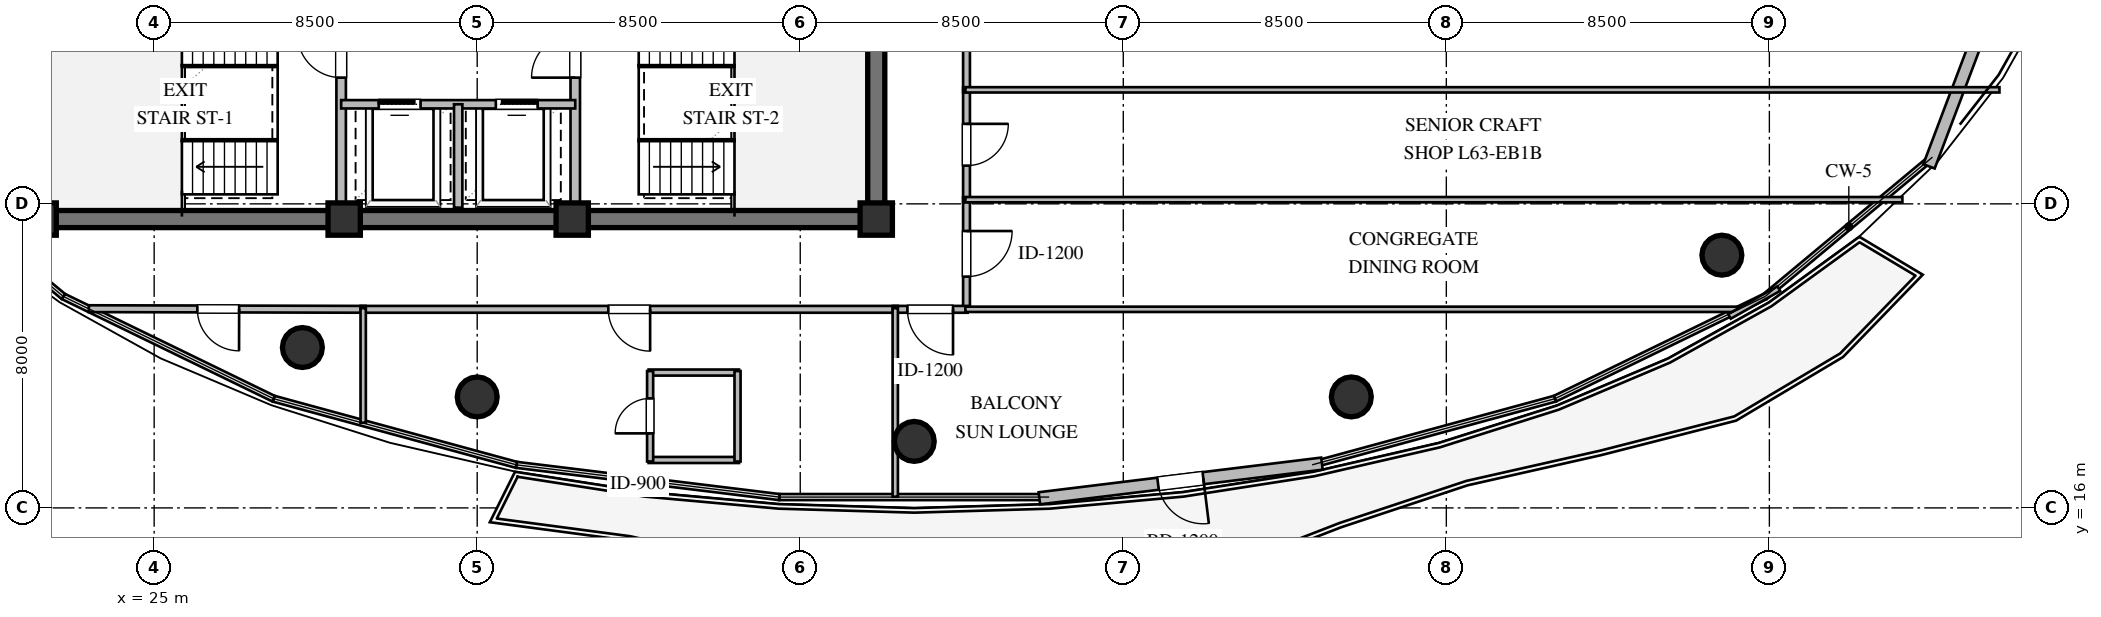
"""IFC4 building model, lengths in metres.
Left out: names, types, materials, properties, quantities, classifications, styles, units other than length and angle.
Written with IfcOpenShell. Run it as: python <this file> out.ifc"""

import sys

from ifc_helpers import new_model, si_unit, direction, frame, frame_2d, origin, origin_2d, place, context, subcontext, project, spatial, rectangle, circle, extrude, element, fill, save


model = new_model("IFC4")
c1 = context("Model", 3, precision=1e-05, world=origin(), true_north=direction((0.0, 1.0)))
c2 = subcontext(c1, "Body", "Model", "MODEL_VIEW")
j1 = project(units=[si_unit("LENGTHUNIT", "METRE"), si_unit("PLANEANGLEUNIT", "RADIAN")], contexts=[c1])
p1 = place(None, origin())
s1 = spatial("IfcSite", under=j1, at=p1, CompositionType="ELEMENT")
p2 = place(p1, origin())
s2 = spatial("IfcBuilding", under=s1, at=p2, CompositionType="ELEMENT")
p3 = place(p2, frame((0.0, 0.0, 238.8)))
s3 = spatial("IfcBuildingStorey", under=s2, at=p3, CompositionType="ELEMENT", Elevation=238.8)
p4 = place(p3, frame((21.775, 23.6, 0.0), z_axis=(0.0, 0.0, 1.0), x_axis=(1.0, 0.0, 0.0)))
e1 = element("IfcWall", 1, at=p4, inside=s3, PredefinedType="SHEAR", context=c2, shape_type="SweptSolid", body=[
    extrude(rectangle(XDim=22.45, YDim=0.45, at=frame_2d((11.225, 0.0))), origin(), (0.0, 0.0, 1.0), 3.36),
])
p5 = place(p3, frame((44.0, 23.825, 0.0), z_axis=(0.0, 0.0, 1.0), x_axis=(0.0, 1.0, 0.0)))
e2 = element("IfcWall", 2, at=p5, inside=s3, PredefinedType="SHEAR", context=c2, shape_type="SweptSolid", body=[
    extrude(rectangle(XDim=12.35, YDim=0.45, at=frame_2d((6.175, 0.0))), origin(), (0.0, 0.0, 1.0), 3.36),
])
p6 = place(p5, frame((8.675, 0.0, 0.0)))
e3 = element("IfcOpeningElement", 3, at=p6, cuts=e2, PredefinedType="OPENING", context=c2, shape_type="SweptSolid", body=[
    extrude(rectangle(XDim=1.5, YDim=2.15, at=frame_2d((0.75, 1.075))), frame((0.0, 0.235, 0.0), z_axis=(0.0, -1.0, 0.0), x_axis=(1.0, 0.0, 0.0)), (0.0, 0.0, 1.0), 0.47),
])
for number, where, z_axis, x_axis in (
    (4, (22.0, 23.6, 0.0), (0.0, 0.0, 1.0), (1.0, 0.0, 0.0)),
    (5, (30.0, 23.6, 0.0), (0.0, 0.0, 1.0), (1.0, 0.0, 0.0)),
    (6, (36.0, 23.6, 0.0), (0.0, 0.0, 1.0), (1.0, 0.0, 0.0)),
    (7, (44.0, 23.6, 0.0), (0.0, 0.0, 1.0), (1.0, 0.0, 0.0)),
):
    element("IfcColumn", number, at=place(p3, frame(where, z_axis=z_axis, x_axis=x_axis)), inside=s3, PredefinedType="COLUMN", context=c2, shape_type="SweptSolid", body=[
        extrude(rectangle(XDim=0.85, YDim=0.85, at=origin_2d()), origin(), (0.0, 0.0, 1.0), 3.6),
    ])
for number, where, z_axis, x_axis in (
    (8, (28.9, 20.22, 0.0), (0.0, 0.0, 1.0), (1.0, 0.0, 0.0)),
    (9, (33.5, 18.92, 0.0), (0.0, 0.0, 1.0), (1.0, 0.0, 0.0)),
    (10, (45.0, 17.75, 0.0), (0.0, 0.0, 1.0), (1.0, 0.0, 0.0)),
    (11, (56.5, 18.92, 0.0), (0.0, 0.0, 1.0), (1.0, 0.0, 0.0)),
    (12, (66.25, 22.65, 0.0), (0.0, 0.0, 1.0), (1.0, 0.0, 0.0)),
):
    element("IfcColumn", number, at=place(p3, frame(where, z_axis=z_axis, x_axis=x_axis)), inside=s3, PredefinedType="COLUMN", context=c2, shape_type="SweptSolid", body=[
        extrude(circle(Radius=0.525, at=origin_2d()), origin(), (0.0, 0.0, 1.0), 3.6),
    ])
p7 = place(p3, frame((76.712, 38.243, 0.0), z_axis=(0.0, 0.0, 1.0), x_axis=(-0.353659523244, -0.935374225441, 0.0)))
e13 = element("IfcWall", 13, at=p7, inside=s3, PredefinedType="STANDARD", context=c2, shape_type="SweptSolid", body=[
    extrude(rectangle(XDim=14.172, YDim=0.32, at=frame_2d((7.086, 0.0))), origin(), (0.0, 0.0, 1.0), 3.36),
])
p8 = place(p3, frame((55.727, 17.165, 0.0), z_axis=(0.0, 0.0, 1.0), x_axis=(-0.992559081031, -0.121763995755, 0.0)))
e14 = element("IfcWall", 14, at=p8, inside=s3, PredefinedType="STANDARD", context=c2, shape_type="SweptSolid", body=[
    extrude(rectangle(XDim=7.491, YDim=0.32, at=frame_2d((3.745, 0.0))), origin(), (0.0, 0.0, 1.0), 3.36),
])
p9 = place(p8, frame((3.145, 0.0, 0.0)))
e15 = element("IfcOpeningElement", 15, at=p9, cuts=e14, PredefinedType="OPENING", context=c2, shape_type="SweptSolid", body=[
    extrude(rectangle(XDim=1.2, YDim=2.15, at=frame_2d((0.6, 1.075))), frame((0.0, 0.17, 0.0), z_axis=(0.0, -1.0, 0.0), x_axis=(1.0, 0.0, 0.0)), (0.0, 0.0, 1.0), 0.34),
])
p10 = place(p3, frame((29.92, 23.9, 0.0), z_axis=(0.0, 0.0, 1.0), x_axis=(0.0, 1.0, 0.0)))
e16 = element("IfcWall", 16, at=p10, inside=s3, PredefinedType="SOLIDWALL", context=c2, shape_type="SweptSolid", body=[
    extrude(rectangle(XDim=5.4, YDim=0.25, at=frame_2d((2.7, 0.0))), origin(), (0.0, 0.0, 1.0), 3.36),
])
p11 = place(p10, frame((3.421, 0.0, 0.0)))
e17 = element("IfcOpeningElement", 17, at=p11, cuts=e16, PredefinedType="OPENING", context=c2, shape_type="SweptSolid", body=[
    extrude(rectangle(XDim=1.15, YDim=2.1, at=frame_2d((0.575, 1.05))), frame((0.0, 0.135, 0.0), z_axis=(0.0, -1.0, 0.0), x_axis=(1.0, 0.0, 0.0)), (0.0, 0.0, 1.0), 0.27),
])
p12 = place(p3, frame((36.08, 23.9, 0.0), z_axis=(0.0, 0.0, 1.0), x_axis=(0.0, 1.0, 0.0)))
e18 = element("IfcWall", 18, at=p12, inside=s3, PredefinedType="SOLIDWALL", context=c2, shape_type="SweptSolid", body=[
    extrude(rectangle(XDim=5.4, YDim=0.25, at=frame_2d((2.7, 0.0))), origin(), (0.0, 0.0, 1.0), 3.36),
])
p13 = place(p12, frame((3.421, 0.0, 0.0)))
e19 = element("IfcOpeningElement", 19, at=p13, cuts=e18, PredefinedType="OPENING", context=c2, shape_type="SweptSolid", body=[
    extrude(rectangle(XDim=1.15, YDim=2.1, at=frame_2d((0.575, 1.05))), frame((0.0, 0.135, 0.0), z_axis=(0.0, -1.0, 0.0), x_axis=(1.0, 0.0, 0.0)), (0.0, 0.0, 1.0), 0.27),
])
p14 = place(p3, frame((29.92, 26.62, 0.0), z_axis=(0.0, 0.0, 1.0), x_axis=(1.0, 0.0, 0.0)))
e20 = element("IfcWall", 20, at=p14, inside=s3, PredefinedType="SOLIDWALL", context=c2, shape_type="SweptSolid", body=[
    extrude(rectangle(XDim=6.16, YDim=0.22, at=frame_2d((3.08, 0.0))), origin(), (0.0, 0.0, 1.0), 3.36),
])
p15 = place(p14, frame((0.99, 0.0, 0.0)))
e21 = element("IfcOpeningElement", 21, at=p15, cuts=e20, PredefinedType="OPENING", context=c2, shape_type="SweptSolid", body=[
    extrude(rectangle(XDim=1.1, YDim=2.1, at=frame_2d((0.55, 1.05))), frame((0.0, 0.12, 0.0), z_axis=(0.0, -1.0, 0.0), x_axis=(1.0, 0.0, 0.0)), (0.0, 0.0, 1.0), 0.24),
])
p16 = place(p14, frame((4.07, 0.0, 0.0)))
e22 = element("IfcOpeningElement", 22, at=p16, cuts=e20, PredefinedType="OPENING", context=c2, shape_type="SweptSolid", body=[
    extrude(rectangle(XDim=1.1, YDim=2.1, at=frame_2d((0.55, 1.05))), frame((0.0, 0.12, 0.0), z_axis=(0.0, -1.0, 0.0), x_axis=(1.0, 0.0, 0.0)), (0.0, 0.0, 1.0), 0.24),
])
p17 = place(p3, frame((33.0, 23.9, 0.0), z_axis=(0.0, 0.0, 1.0), x_axis=(0.0, 1.0, 0.0)))
e23 = element("IfcWall", 23, at=p17, inside=s3, PredefinedType="SOLIDWALL", context=c2, shape_type="SweptSolid", body=[
    extrude(rectangle(XDim=2.72, YDim=0.22, at=frame_2d((1.36, 0.0))), origin(), (0.0, 0.0, 1.0), 3.36),
])
for number, where, z_axis, x_axis in (
    (24, (38.01, 17.261, 0.0), (0.0, 0.0, 1.0), (1.0, 0.0, 0.0)),
    (25, (38.01, 19.561, 0.0), (0.0, 0.0, 1.0), (1.0, 0.0, 0.0)),
):
    element("IfcWall", number, at=place(p3, frame(where, z_axis=z_axis, x_axis=x_axis)), inside=s3, PredefinedType="PLUMBINGWALL", context=c2, shape_type="SweptSolid", body=[
        extrude(rectangle(XDim=2.38, YDim=0.16, at=frame_2d((1.19, 0.0))), origin(), (0.0, 0.0, 1.0), 3.36),
    ])
p18 = place(p3, frame((38.05, 17.221, 0.0), z_axis=(0.0, 0.0, 1.0), x_axis=(0.0, 1.0, 0.0)))
e26 = element("IfcWall", 26, at=p18, inside=s3, PredefinedType="PLUMBINGWALL", context=c2, shape_type="SweptSolid", body=[
    extrude(rectangle(XDim=2.38, YDim=0.16, at=frame_2d((1.19, 0.0))), origin(), (0.0, 0.0, 1.0), 3.36),
])
p19 = place(p18, frame((0.74, 0.0, 0.0)))
e27 = element("IfcOpeningElement", 27, at=p19, cuts=e26, PredefinedType="OPENING", context=c2, shape_type="SweptSolid", body=[
    extrude(rectangle(XDim=0.92, YDim=2.1, at=frame_2d((0.46, 1.05))), frame((0.0, 0.09, 0.0), z_axis=(0.0, -1.0, 0.0), x_axis=(1.0, 0.0, 0.0)), (0.0, 0.0, 1.0), 0.18),
])
p20 = place(p3, frame((40.35, 17.221, 0.0), z_axis=(0.0, 0.0, 1.0), x_axis=(0.0, 1.0, 0.0)))
e28 = element("IfcWall", 28, at=p20, inside=s3, PredefinedType="PLUMBINGWALL", context=c2, shape_type="SweptSolid", body=[
    extrude(rectangle(XDim=2.38, YDim=0.16, at=frame_2d((1.19, 0.0))), origin(), (0.0, 0.0, 1.0), 3.36),
])
p21 = place(p3, frame((46.375, 24.175, 0.0), z_axis=(0.0, 0.0, 1.0), x_axis=(0.0, -1.0, 0.0)))
e29 = element("IfcWall", 29, at=p21, inside=s3, PredefinedType="PARTITIONING", context=c2, shape_type="SweptSolid", body=[
    extrude(rectangle(XDim=2.98, YDim=0.18, at=frame_2d((1.49, 0.0))), origin(), (0.0, 0.0, 1.0), 3.36),
])
p22 = place(p21, frame((0.89, 0.0, 0.0)))
e30 = element("IfcOpeningElement", 30, at=p22, cuts=e29, PredefinedType="OPENING", context=c2, shape_type="SweptSolid", body=[
    extrude(rectangle(XDim=1.2, YDim=2.15, at=frame_2d((0.6, 1.075))), frame((0.0, 0.1, 0.0), z_axis=(0.0, -1.0, 0.0), x_axis=(1.0, 0.0, 0.0)), (0.0, 0.0, 1.0), 0.2),
])
p23 = place(p3, frame((46.375, 27.065, 0.0), z_axis=(0.0, 0.0, 1.0), x_axis=(0.0, -1.0, 0.0)))
e31 = element("IfcWall", 31, at=p23, inside=s3, PredefinedType="PARTITIONING", context=c2, shape_type="SweptSolid", body=[
    extrude(rectangle(XDim=3.02, YDim=0.18, at=frame_2d((1.51, 0.0))), origin(), (0.0, 0.0, 1.0), 3.36),
])
p24 = place(p23, frame((0.96, 0.0, 0.0)))
e32 = element("IfcOpeningElement", 32, at=p24, cuts=e31, PredefinedType="OPENING", context=c2, shape_type="SweptSolid", body=[
    extrude(rectangle(XDim=1.1, YDim=2.1, at=frame_2d((0.55, 1.05))), frame((0.0, 0.1, 0.0), z_axis=(0.0, -1.0, 0.0), x_axis=(1.0, 0.0, 0.0)), (0.0, 0.0, 1.0), 0.2),
])
p25 = place(p3, frame((46.375, 30.815, 0.0), z_axis=(0.0, 0.0, 1.0), x_axis=(0.0, -1.0, 0.0)))
e33 = element("IfcWall", 33, at=p25, inside=s3, PredefinedType="PARTITIONING", context=c2, shape_type="SweptSolid", body=[
    extrude(rectangle(XDim=3.88, YDim=0.18, at=frame_2d((1.94, 0.0))), origin(), (0.0, 0.0, 1.0), 3.36),
])
p26 = place(p25, frame((1.39, 0.0, 0.0)))
e34 = element("IfcOpeningElement", 34, at=p26, cuts=e33, PredefinedType="OPENING", context=c2, shape_type="SweptSolid", body=[
    extrude(rectangle(XDim=1.1, YDim=2.1, at=frame_2d((0.55, 1.05))), frame((0.0, 0.1, 0.0), z_axis=(0.0, -1.0, 0.0), x_axis=(1.0, 0.0, 0.0)), (0.0, 0.0, 1.0), 0.2),
])
p27 = place(p3, frame((30.565, 21.225, 0.0), z_axis=(0.0, 0.0, 1.0), x_axis=(-0.999997325315, 0.002312868818, 0.0)))
e35 = element("IfcWall", 35, at=p27, inside=s3, PredefinedType="PARTITIONING", context=c2, shape_type="SweptSolid", body=[
    extrude(rectangle(XDim=7.283, YDim=0.18, at=frame_2d((3.642, 0.0))), origin(), (0.0, 0.0, 1.0), 2.89),
])
p28 = place(p27, frame((3.329, 0.0, 0.0)))
e36 = element("IfcOpeningElement", 36, at=p28, cuts=e35, PredefinedType="OPENING", context=c2, shape_type="SweptSolid", body=[
    extrude(rectangle(XDim=1.1, YDim=2.1, at=frame_2d((0.55, 1.05))), frame((0.0, 0.1, 0.0), z_axis=(0.0, -1.0, 0.0), x_axis=(1.0, 0.0, 0.0)), (0.0, 0.0, 1.0), 0.2),
])
p29 = place(p3, frame((44.565, 21.225, 0.0), z_axis=(0.0, 0.0, 1.0), x_axis=(-1.0, 0.0, 0.0)))
e37 = element("IfcWall", 37, at=p29, inside=s3, PredefinedType="PARTITIONING", context=c2, shape_type="SweptSolid", body=[
    extrude(rectangle(XDim=14.13, YDim=0.18, at=frame_2d((7.065, 0.0))), origin(), (0.0, 0.0, 1.0), 2.996),
])
p30 = place(p29, frame((6.515, 0.0, 0.0)))
e38 = element("IfcOpeningElement", 38, at=p30, cuts=e37, PredefinedType="OPENING", context=c2, shape_type="SweptSolid", body=[
    extrude(rectangle(XDim=1.1, YDim=2.1, at=frame_2d((0.55, 1.05))), frame((0.0, 0.1, 0.0), z_axis=(0.0, -1.0, 0.0), x_axis=(1.0, 0.0, 0.0)), (0.0, 0.0, 1.0), 0.2),
])
p31 = place(p3, frame((46.405, 21.225, 0.0), z_axis=(0.0, 0.0, 1.0), x_axis=(-1.0, 0.0, 0.0)))
e39 = element("IfcWall", 39, at=p31, inside=s3, PredefinedType="PARTITIONING", context=c2, shape_type="SweptSolid", body=[
    extrude(rectangle(XDim=1.97, YDim=0.18, at=frame_2d((0.985, 0.0))), origin(), (0.0, 0.0, 1.0), 3.36),
])
p32 = place(p31, frame((0.385, 0.0, 0.0)))
e40 = element("IfcOpeningElement", 40, at=p32, cuts=e39, PredefinedType="OPENING", context=c2, shape_type="SweptSolid", body=[
    extrude(rectangle(XDim=1.2, YDim=2.15, at=frame_2d((0.6, 1.075))), frame((0.0, 0.1, 0.0), z_axis=(0.0, -1.0, 0.0), x_axis=(1.0, 0.0, 0.0)), (0.0, 0.0, 1.0), 0.2),
])
p33 = place(p3, frame((46.345, 24.11, 0.0), z_axis=(0.0, 0.0, 1.0), x_axis=(1.0, 0.0, 0.0)))
e41 = element("IfcWall", 41, at=p33, inside=s3, PredefinedType="PARTITIONING", context=c2, shape_type="SweptSolid", body=[
    extrude(rectangle(XDim=24.655, YDim=0.14, at=frame_2d((12.328, 0.0))), origin(), (0.0, 0.0, 1.0), 2.89),
])
p34 = place(p3, frame((66.684, 21.225, 0.0), z_axis=(0.0, 0.0, 1.0), x_axis=(-1.0, 0.0, 0.0)))
e42 = element("IfcWall", 42, at=p34, inside=s3, PredefinedType="PARTITIONING", context=c2, shape_type="SweptSolid", body=[
    extrude(rectangle(XDim=20.339, YDim=0.14, at=frame_2d((10.169, 0.0))), origin(), (0.0, 0.0, 1.0), 2.996),
])
p35 = place(p3, frame((67.748, 21.77, 0.0), z_axis=(0.0, 0.0, 1.0), x_axis=(-0.871352238731, -0.490658003153, 0.0)))
e43 = element("IfcWall", 43, at=p35, inside=s3, PredefinedType="PARTITIONING", context=c2, shape_type="SweptSolid", body=[
    extrude(rectangle(XDim=1.49, YDim=0.14, at=frame_2d((0.745, 0.0))), origin(), (0.0, 0.0, 1.0), 3.36),
])
p36 = place(p3, frame((46.345, 27.0, 0.0), z_axis=(0.0, 0.0, 1.0), x_axis=(1.0, 0.0, 0.0)))
e44 = element("IfcWall", 44, at=p36, inside=s3, PredefinedType="PARTITIONING", context=c2, shape_type="SweptSolid", body=[
    extrude(rectangle(XDim=27.209, YDim=0.14, at=frame_2d((13.604, 0.0))), origin(), (0.0, 0.0, 1.0), 2.89),
])
p37 = place(p3, frame((30.5, 21.255, 0.0), z_axis=(0.0, 0.0, 1.0), x_axis=(0.0, -1.0, 0.0)))
e45 = element("IfcWall", 45, at=p37, inside=s3, PredefinedType="PARTITIONING", context=c2, shape_type="SweptSolid", body=[
    extrude(rectangle(XDim=3.014, YDim=0.14, at=frame_2d((1.507, 0.0))), origin(), (0.0, 0.0, 1.0), 3.36),
])
p38 = place(p3, frame((44.5, 21.255, 0.0), z_axis=(0.0, 0.0, 1.0), x_axis=(0.0, -1.0, 0.0)))
e46 = element("IfcWall", 46, at=p38, inside=s3, PredefinedType="PARTITIONING", context=c2, shape_type="SweptSolid", body=[
    extrude(rectangle(XDim=4.96, YDim=0.14, at=frame_2d((2.48, 0.0))), origin(), (0.0, 0.0, 1.0), 2.89),
])
p39 = place(p9, origin())
e47 = element("IfcDoor", 47, at=p39, inside=s3, OperationType="SINGLE_SWING_LEFT", PredefinedType="DOOR", context=c2, shape_type="SweptSolid", body=[
    extrude(rectangle(XDim=1.2, YDim=2.15, at=frame_2d((0.6, 1.075))), frame((0.0, 0.025, 0.0), z_axis=(0.0, -1.0, 0.0), x_axis=(1.0, 0.0, 0.0)), (0.0, 0.0, 1.0), 0.05),
])
fill(e15, e47)
p40 = place(p11, origin())
e48 = element("IfcDoor", 48, at=p40, inside=s3, OperationType="SINGLE_SWING_RIGHT", PredefinedType="DOOR", context=c2, shape_type="SweptSolid", body=[
    extrude(rectangle(XDim=1.15, YDim=2.1, at=frame_2d((0.575, 1.05))), frame((0.0, 0.025, 0.0), z_axis=(0.0, -1.0, 0.0), x_axis=(1.0, 0.0, 0.0)), (0.0, 0.0, 1.0), 0.05),
])
fill(e17, e48)
p41 = place(p13, origin())
e49 = element("IfcDoor", 49, at=p41, inside=s3, OperationType="SINGLE_SWING_LEFT", PredefinedType="DOOR", context=c2, shape_type="SweptSolid", body=[
    extrude(rectangle(XDim=1.15, YDim=2.1, at=frame_2d((0.575, 1.05))), frame((0.0, 0.025, 0.0), z_axis=(0.0, -1.0, 0.0), x_axis=(1.0, 0.0, 0.0)), (0.0, 0.0, 1.0), 0.05),
])
fill(e19, e49)
p42 = place(p15, origin())
e50 = element("IfcDoor", 50, at=p42, inside=s3, OperationType="SLIDING_TO_LEFT", PredefinedType="DOOR", context=c2, shape_type="SweptSolid", body=[
    extrude(rectangle(XDim=1.1, YDim=2.1, at=frame_2d((0.55, 1.05))), frame((0.0, 0.025, 0.0), z_axis=(0.0, -1.0, 0.0), x_axis=(1.0, 0.0, 0.0)), (0.0, 0.0, 1.0), 0.05),
])
fill(e21, e50)
p43 = place(p16, origin())
e51 = element("IfcDoor", 51, at=p43, inside=s3, OperationType="SLIDING_TO_RIGHT", PredefinedType="DOOR", context=c2, shape_type="SweptSolid", body=[
    extrude(rectangle(XDim=1.1, YDim=2.1, at=frame_2d((0.55, 1.05))), frame((0.0, 0.025, 0.0), z_axis=(0.0, -1.0, 0.0), x_axis=(1.0, 0.0, 0.0)), (0.0, 0.0, 1.0), 0.05),
])
fill(e22, e51)
p44 = place(p19, origin())
e52 = element("IfcDoor", 52, at=p44, inside=s3, OperationType="SINGLE_SWING_LEFT", PredefinedType="DOOR", context=c2, shape_type="SweptSolid", body=[
    extrude(rectangle(XDim=0.92, YDim=2.1, at=frame_2d((0.46, 1.05))), frame((0.0, 0.025, 0.0), z_axis=(0.0, -1.0, 0.0), x_axis=(1.0, 0.0, 0.0)), (0.0, 0.0, 1.0), 0.05),
])
fill(e27, e52)
p45 = place(p22, origin())
e53 = element("IfcDoor", 53, at=p45, inside=s3, OperationType="SINGLE_SWING_LEFT", PredefinedType="DOOR", context=c2, shape_type="SweptSolid", body=[
    extrude(rectangle(XDim=1.2, YDim=2.15, at=frame_2d((0.6, 1.075))), frame((0.0, 0.025, 0.0), z_axis=(0.0, -1.0, 0.0), x_axis=(1.0, 0.0, 0.0)), (0.0, 0.0, 1.0), 0.05),
])
fill(e30, e53)
p46 = place(p24, origin())
e54 = element("IfcDoor", 54, at=p46, inside=s3, OperationType="SINGLE_SWING_LEFT", PredefinedType="DOOR", context=c2, shape_type="SweptSolid", body=[
    extrude(rectangle(XDim=1.1, YDim=2.1, at=frame_2d((0.55, 1.05))), frame((0.0, 0.025, 0.0), z_axis=(0.0, -1.0, 0.0), x_axis=(1.0, 0.0, 0.0)), (0.0, 0.0, 1.0), 0.05),
])
fill(e32, e54)
p47 = place(p28, origin())
e55 = element("IfcDoor", 55, at=p47, inside=s3, OperationType="SINGLE_SWING_LEFT", PredefinedType="DOOR", context=c2, shape_type="SweptSolid", body=[
    extrude(rectangle(XDim=1.1, YDim=2.1, at=frame_2d((0.55, 1.05))), frame((0.0, 0.025, 0.0), z_axis=(0.0, -1.0, 0.0), x_axis=(1.0, 0.0, 0.0)), (0.0, 0.0, 1.0), 0.05),
])
fill(e36, e55)
p48 = place(p30, origin())
e56 = element("IfcDoor", 56, at=p48, inside=s3, OperationType="SINGLE_SWING_LEFT", PredefinedType="DOOR", context=c2, shape_type="SweptSolid", body=[
    extrude(rectangle(XDim=1.1, YDim=2.1, at=frame_2d((0.55, 1.05))), frame((0.0, 0.025, 0.0), z_axis=(0.0, -1.0, 0.0), x_axis=(1.0, 0.0, 0.0)), (0.0, 0.0, 1.0), 0.05),
])
fill(e38, e56)
p49 = place(p32, origin())
e57 = element("IfcDoor", 57, at=p49, inside=s3, OperationType="SINGLE_SWING_LEFT", PredefinedType="DOOR", context=c2, shape_type="SweptSolid", body=[
    extrude(rectangle(XDim=1.2, YDim=2.15, at=frame_2d((0.6, 1.075))), frame((0.0, 0.025, 0.0), z_axis=(0.0, -1.0, 0.0), x_axis=(1.0, 0.0, 0.0)), (0.0, 0.0, 1.0), 0.05),
])
fill(e40, e57)
save(model, sys.argv[1])
